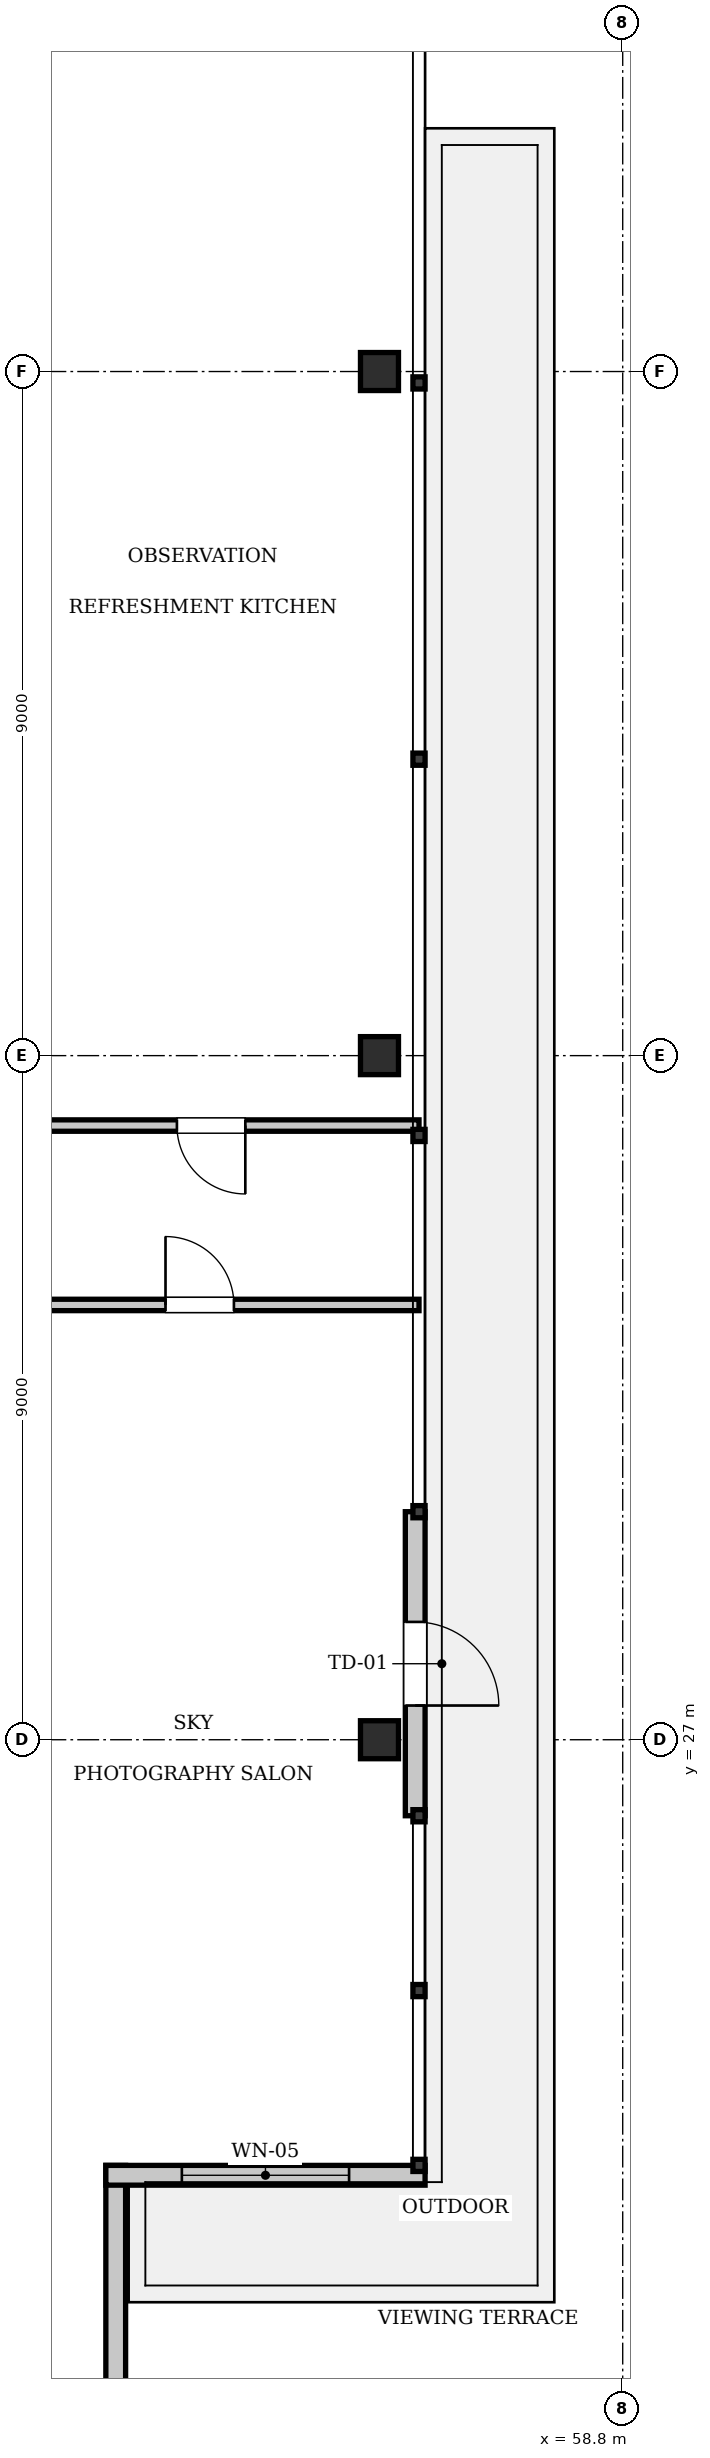
"""IFC4 building model, lengths in metres.
Left out: names, types, materials, properties, quantities, classifications, styles, units other than length and angle.
Written with IfcOpenShell. Run it as: python <this file> out.ifc"""

import sys

from ifc_helpers import new_model, si_unit, direction, frame, frame_2d, origin, origin_2d, place, context, subcontext, project, spatial, rectangle, i_section, extrude, element, fill, save


model = new_model("IFC4")
c1 = context("Model", 3, precision=1e-05, world=origin(), true_north=direction((0.0, 1.0)))
c2 = subcontext(c1, "Body", "Model", "MODEL_VIEW")
j1 = project(units=[si_unit("LENGTHUNIT", "METRE"), si_unit("PLANEANGLEUNIT", "RADIAN")], contexts=[c1])
p1 = place(None, origin())
s1 = spatial("IfcSite", under=j1, at=p1, CompositionType="ELEMENT")
p2 = place(p1, origin())
s2 = spatial("IfcBuilding", under=s1, at=p2, CompositionType="ELEMENT")
p3 = place(p2, frame((0.0, 0.0, 354.2)))
s3 = spatial("IfcBuildingStorey", under=s2, at=p3, CompositionType="ELEMENT", Elevation=354.2)
for number, where, z_axis, x_axis in (
    (1, (55.6, 27.0, -0.26), (0.0, 0.0, 1.0), (1.0, 0.0, 0.0)),
    (2, (55.6, 36.0, -0.26), (0.0, 0.0, 1.0), (1.0, 0.0, 0.0)),
    (3, (55.6, 45.0, -0.26), (0.0, 0.0, 1.0), (1.0, 0.0, 0.0)),
):
    element("IfcColumn", number, at=place(p3, frame(where, z_axis=z_axis, x_axis=x_axis)), inside=s3, PredefinedType="COLUMN", context=c2, shape_type="SweptSolid", body=[
        extrude(i_section(OverallWidth=0.5, OverallDepth=0.5, WebThickness=0.022, FlangeThickness=0.032, at=origin_2d()), origin(), (0.0, 0.0, 1.0), 5.16),
    ])
p4 = place(p3, frame((52.13, 21.4, 0.0), z_axis=(0.0, 0.0, 1.0), x_axis=(0.0, -1.0, 0.0)))
e4 = element("IfcWall", 4, at=p4, inside=s3, PredefinedType="SOLIDWALL", context=c2, shape_type="SweptSolid", body=[
    extrude(rectangle(XDim=4.2, YDim=0.26, at=frame_2d((2.1, 0.0))), origin(), (0.0, 0.0, 1.0), 4.64),
])
p5 = place(p3, frame((56.2, 21.27, 0.0), z_axis=(0.0, 0.0, 1.0), x_axis=(-1.0, 0.0, 0.0)))
e5 = element("IfcWall", 5, at=p5, inside=s3, PredefinedType="SOLIDWALL", context=c2, shape_type="SweptSolid", body=[
    extrude(rectangle(XDim=4.2, YDim=0.26, at=frame_2d((2.1, 0.0))), origin(), (0.0, 0.0, 1.0), 4.64),
])
p6 = place(p5, frame((1.0, 0.0, 0.9)))
e6 = element("IfcOpeningElement", 6, at=p6, cuts=e5, PredefinedType="OPENING", context=c2, shape_type="SweptSolid", body=[
    extrude(rectangle(XDim=2.2, YDim=2.8, at=frame_2d((1.1, 1.4))), frame((0.0, 0.14, 0.0), z_axis=(0.0, -1.0, 0.0), x_axis=(1.0, 0.0, 0.0)), (0.0, 0.0, 1.0), 0.28),
])
p7 = place(p3, frame((56.07, 26.0, 0.0), z_axis=(0.0, 0.0, 1.0), x_axis=(0.0, 1.0, 0.0)))
e7 = element("IfcWall", 7, at=p7, inside=s3, PredefinedType="SOLIDWALL", context=c2, shape_type="SweptSolid", body=[
    extrude(rectangle(XDim=4.0, YDim=0.26, at=frame_2d((2.0, 0.0))), origin(), (0.0, 0.0, 1.0), 4.64),
])
p8 = place(p7, frame((1.45, 0.0, 0.0)))
e8 = element("IfcOpeningElement", 8, at=p8, cuts=e7, PredefinedType="OPENING", context=c2, shape_type="SweptSolid", body=[
    extrude(rectangle(XDim=1.1, YDim=2.2, at=frame_2d((0.55, 1.1))), frame((0.0, 0.14, 0.0), z_axis=(0.0, -1.0, 0.0), x_axis=(1.0, 0.0, 0.0)), (0.0, 0.0, 1.0), 0.28),
])
p9 = place(p3, frame((50.35, 32.72, 0.0), z_axis=(0.0, 0.0, 1.0), x_axis=(1.0, 0.0, 0.0)))
e9 = element("IfcWall", 9, at=p9, inside=s3, PredefinedType="PARTITIONING", context=c2, shape_type="SweptSolid", body=[
    extrude(rectangle(XDim=5.77, YDim=0.15, at=frame_2d((2.885, 0.0))), origin(), (0.0, 0.0, 1.0), 4.64),
])
p10 = place(p9, frame((2.435, 0.0, 0.0)))
e10 = element("IfcOpeningElement", 10, at=p10, cuts=e9, PredefinedType="OPENING", context=c2, shape_type="SweptSolid", body=[
    extrude(rectangle(XDim=0.9, YDim=2.1, at=frame_2d((0.45, 1.05))), frame((0.0, 0.085, 0.0), z_axis=(0.0, -1.0, 0.0), x_axis=(1.0, 0.0, 0.0)), (0.0, 0.0, 1.0), 0.17),
])
p11 = place(p3, frame((50.65, 35.08, 0.0), z_axis=(0.0, 0.0, 1.0), x_axis=(1.0, 0.0, 0.0)))
e11 = element("IfcWall", 11, at=p11, inside=s3, PredefinedType="PARTITIONING", context=c2, shape_type="SweptSolid", body=[
    extrude(rectangle(XDim=5.47, YDim=0.15, at=frame_2d((2.735, 0.0))), origin(), (0.0, 0.0, 1.0), 4.64),
])
p12 = place(p11, frame((2.285, 0.0, 0.0)))
e12 = element("IfcOpeningElement", 12, at=p12, cuts=e11, PredefinedType="OPENING", context=c2, shape_type="SweptSolid", body=[
    extrude(rectangle(XDim=0.9, YDim=2.1, at=frame_2d((0.45, 1.05))), frame((0.0, 0.085, 0.0), z_axis=(0.0, -1.0, 0.0), x_axis=(1.0, 0.0, 0.0)), (0.0, 0.0, 1.0), 0.17),
])
p13 = place(p6, origin())
e13 = element("IfcWindow", 13, at=p13, inside=s3, PartitioningType="SINGLE_PANEL", PredefinedType="WINDOW", context=c2, shape_type="SweptSolid", body=[
    extrude(rectangle(XDim=2.2, YDim=2.8, at=frame_2d((1.1, 1.4))), frame((0.0, 0.03, 0.0), z_axis=(0.0, -1.0, 0.0), x_axis=(1.0, 0.0, 0.0)), (0.0, 0.0, 1.0), 0.06),
])
fill(e6, e13)
p14 = place(p8, frame((1.1, 0.0, 0.0), z_axis=(0.0, 0.0, 1.0), x_axis=(-1.0, 0.0, 0.0)))
e14 = element("IfcDoor", 14, at=p14, inside=s3, OperationType="SINGLE_SWING_RIGHT", PredefinedType="DOOR", context=c2, shape_type="SweptSolid", body=[
    extrude(rectangle(XDim=1.1, YDim=2.2, at=frame_2d((0.55, 1.1))), frame((0.0, 0.025, 0.0), z_axis=(0.0, -1.0, 0.0), x_axis=(1.0, 0.0, 0.0)), (0.0, 0.0, 1.0), 0.05),
])
fill(e8, e14)
p15 = place(p10, origin())
e15 = element("IfcDoor", 15, at=p15, inside=s3, OperationType="SINGLE_SWING_LEFT", PredefinedType="DOOR", context=c2, shape_type="SweptSolid", body=[
    extrude(rectangle(XDim=0.9, YDim=2.1, at=frame_2d((0.45, 1.05))), frame((0.0, 0.025, 0.0), z_axis=(0.0, -1.0, 0.0), x_axis=(1.0, 0.0, 0.0)), (0.0, 0.0, 1.0), 0.05),
])
fill(e10, e15)
p16 = place(p12, frame((0.9, 0.0, 0.0), z_axis=(0.0, 0.0, 1.0), x_axis=(-1.0, 0.0, 0.0)))
e16 = element("IfcDoor", 16, at=p16, inside=s3, OperationType="SINGLE_SWING_LEFT", PredefinedType="DOOR", context=c2, shape_type="SweptSolid", body=[
    extrude(rectangle(XDim=0.9, YDim=2.1, at=frame_2d((0.45, 1.05))), frame((0.0, 0.025, 0.0), z_axis=(0.0, -1.0, 0.0), x_axis=(1.0, 0.0, 0.0)), (0.0, 0.0, 1.0), 0.05),
])
fill(e12, e16)
save(model, sys.argv[1])
